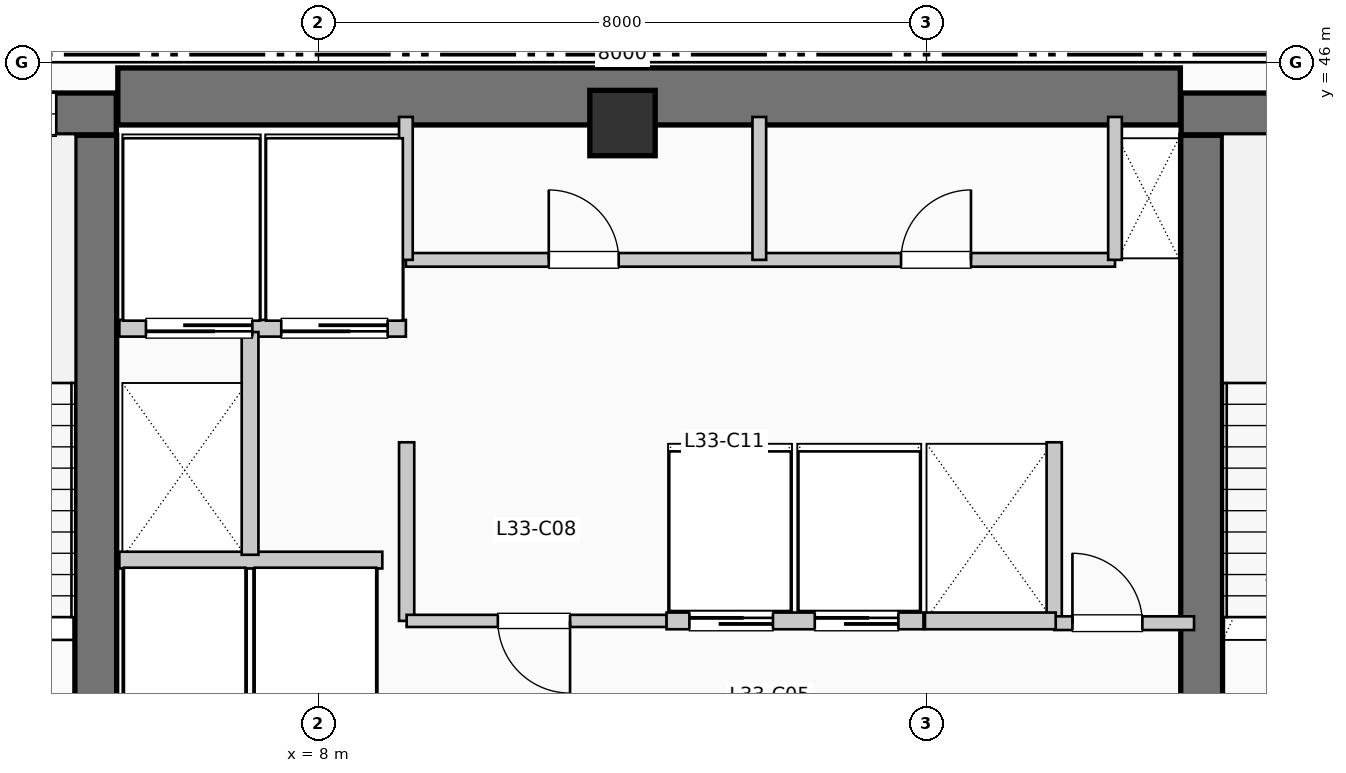
"""IFC4 building model, lengths in metres.
Left out: names, types, materials, properties, quantities, classifications, styles, units other than length and angle.
Written with IfcOpenShell. Run it as: python <this file> out.ifc"""

import sys

from ifc_helpers import new_model, si_unit, direction, frame, frame_2d, origin, origin_2d, place, context, subcontext, project, spatial, rectangle, extrude, element, fill, save


model = new_model("IFC4")
c1 = context("Model", 3, precision=1e-05, world=origin(), true_north=direction((0.0, 1.0)))
c2 = subcontext(c1, "Body", "Model", "MODEL_VIEW")
j1 = project(units=[si_unit("LENGTHUNIT", "METRE"), si_unit("PLANEANGLEUNIT", "RADIAN")], contexts=[c1])
p1 = place(None, origin())
s1 = spatial("IfcSite", under=j1, at=p1, CompositionType="ELEMENT")
p2 = place(p1, origin())
s2 = spatial("IfcBuilding", under=s1, at=p2, CompositionType="ELEMENT")
p3 = place(p2, frame((0.0, 0.0, 138.93)))
s3 = spatial("IfcBuildingStorey", under=s2, at=p3, CompositionType="ELEMENT", Elevation=138.93)
p4 = place(p3, frame((5.36, 45.55, 0.0), z_axis=(0.0, 0.0, 1.0), x_axis=(1.0, 0.0, 0.0)))
e1 = element("IfcWall", 1, at=p4, inside=s3, PredefinedType="SHEAR", context=c2, shape_type="SweptSolid", body=[
    extrude(rectangle(XDim=13.98, YDim=0.75, at=frame_2d((6.99, 0.0))), origin(), (0.0, 0.0, 1.0), 3.96),
])
p5 = place(p3, frame((5.07, 37.15, 0.0), z_axis=(0.0, 0.0, 1.0), x_axis=(0.0, 1.0, 0.0)))
e2 = element("IfcWall", 2, at=p5, inside=s3, PredefinedType="SHEAR", context=c2, shape_type="SweptSolid", body=[
    extrude(rectangle(XDim=7.89, YDim=0.55, at=frame_2d((3.945, 0.0))), origin(), (0.0, 0.0, 1.0), 3.96),
])
p6 = place(p3, frame((1.1, 45.32, 0.0), z_axis=(0.0, 0.0, 1.0), x_axis=(1.0, 0.0, 0.0)))
e3 = element("IfcWall", 3, at=p6, inside=s3, PredefinedType="SHEAR", context=c2, shape_type="SweptSolid", body=[
    extrude(rectangle(XDim=4.24, YDim=0.55, at=frame_2d((2.12, 0.0))), origin(), (0.0, 0.0, 1.0), 3.96),
])
p7 = place(p6, frame((2.05, 0.0, 1.05)))
e4 = element("IfcOpeningElement", 4, at=p7, cuts=e3, PredefinedType="OPENING", context=c2, shape_type="SweptSolid", body=[
    extrude(rectangle(XDim=1.4, YDim=1.8, at=frame_2d((0.7, 0.9))), frame((0.0, 0.285, 0.0), z_axis=(0.0, -1.0, 0.0), x_axis=(1.0, 0.0, 0.0)), (0.0, 0.0, 1.0), 0.57),
])
p8 = place(p3, frame((19.62, 37.15, 0.0), z_axis=(0.0, 0.0, 1.0), x_axis=(0.0, 1.0, 0.0)))
e5 = element("IfcWall", 5, at=p8, inside=s3, PredefinedType="SHEAR", context=c2, shape_type="SweptSolid", body=[
    extrude(rectangle(XDim=7.89, YDim=0.55, at=frame_2d((3.945, 0.0))), origin(), (0.0, 0.0, 1.0), 3.96),
])
p9 = place(p3, frame((19.35, 45.32, 0.0), z_axis=(0.0, 0.0, 1.0), x_axis=(1.0, 0.0, 0.0)))
e6 = element("IfcWall", 6, at=p9, inside=s3, PredefinedType="SHEAR", context=c2, shape_type="SweptSolid", body=[
    extrude(rectangle(XDim=3.69, YDim=0.55, at=frame_2d((1.845, 0.0))), origin(), (0.0, 0.0, 1.0), 3.96),
])
p10 = place(p9, frame((1.15, 0.0, 1.05)))
e7 = element("IfcOpeningElement", 7, at=p10, cuts=e6, PredefinedType="OPENING", context=c2, shape_type="SweptSolid", body=[
    extrude(rectangle(XDim=1.4, YDim=1.8, at=frame_2d((0.7, 0.9))), frame((0.0, 0.285, 0.0), z_axis=(0.0, -1.0, 0.0), x_axis=(1.0, 0.0, 0.0)), (0.0, 0.0, 1.0), 0.57),
])
p11 = place(p3, frame((12.0, 45.2, 0.0), z_axis=(0.0, 0.0, 1.0), x_axis=(1.0, 0.0, 0.0)))
e8 = element("IfcColumn", 8, at=p11, inside=s3, PredefinedType="COLUMN", context=c2, shape_type="SweptSolid", body=[
    extrude(rectangle(XDim=0.86, YDim=0.86, at=origin_2d()), origin(), (0.0, 0.0, 1.0), 3.96),
])
p12 = place(p3, frame((5.38, 39.45, 0.0), z_axis=(0.0, 0.0, 1.0), x_axis=(1.0, 0.0, 0.0)))
e9 = element("IfcWall", 9, at=p12, inside=s3, PredefinedType="PARTITIONING", context=c2, shape_type="SweptSolid", body=[
    extrude(rectangle(XDim=3.46, YDim=0.22, at=frame_2d((1.73, 0.0))), origin(), (0.0, 0.0, 1.0), 3.71),
])
p13 = place(p3, frame((5.38, 42.5, 0.0), z_axis=(0.0, 0.0, 1.0), x_axis=(1.0, 0.0, 0.0)))
e10 = element("IfcWall", 10, at=p13, inside=s3, PredefinedType="PARTITIONING", context=c2, shape_type="SweptSolid", body=[
    extrude(rectangle(XDim=3.77, YDim=0.22, at=frame_2d((1.885, 0.0))), origin(), (0.0, 0.0, 1.0), 3.71),
])
p14 = place(p13, frame((1.75, 0.0, 0.0), z_axis=(0.0, 0.0, 1.0), x_axis=(-1.0, 0.0, 0.0)))
e11 = element("IfcOpeningElement", 11, at=p14, cuts=e10, PredefinedType="OPENING", context=c2, shape_type="SweptSolid", body=[
    extrude(rectangle(XDim=1.4, YDim=2.2, at=frame_2d((0.7, 1.1))), frame((0.0, 0.12, 0.0), z_axis=(0.0, -1.0, 0.0), x_axis=(1.0, 0.0, 0.0)), (0.0, 0.0, 1.0), 0.24),
])
p15 = place(p13, frame((3.53, 0.0, 0.0), z_axis=(0.0, 0.0, 1.0), x_axis=(-1.0, 0.0, 0.0)))
e12 = element("IfcOpeningElement", 12, at=p15, cuts=e10, PredefinedType="OPENING", context=c2, shape_type="SweptSolid", body=[
    extrude(rectangle(XDim=1.4, YDim=2.2, at=frame_2d((0.7, 1.1))), frame((0.0, 0.12, 0.0), z_axis=(0.0, -1.0, 0.0), x_axis=(1.0, 0.0, 0.0)), (0.0, 0.0, 1.0), 0.24),
])
p16 = place(p3, frame((7.1, 39.52, 0.0), z_axis=(0.0, 0.0, 1.0), x_axis=(0.0, 1.0, 0.0)))
e13 = element("IfcWall", 13, at=p16, inside=s3, PredefinedType="PARTITIONING", context=c2, shape_type="SweptSolid", body=[
    extrude(rectangle(XDim=2.93, YDim=0.22, at=frame_2d((1.465, 0.0))), origin(), (0.0, 0.0, 1.0), 3.71),
])
for number, where, z_axis, x_axis in (
    (14, (9.16, 38.65, 0.0), (0.0, 0.0, 1.0), (0.0, 1.0, 0.0)),
    (15, (17.68, 38.65, 0.0), (0.0, 0.0, 1.0), (0.0, 1.0, 0.0)),
):
    element("IfcWall", number, at=place(p3, frame(where, z_axis=z_axis, x_axis=x_axis)), inside=s3, PredefinedType="PARTITIONING", context=c2, shape_type="SweptSolid", body=[
        extrude(rectangle(XDim=2.35, YDim=0.2, at=frame_2d((1.175, 0.0))), origin(), (0.0, 0.0, 1.0), 3.71),
    ])
p17 = place(p3, frame((17.68, 38.62, 0.0), z_axis=(0.0, 0.0, 1.0), x_axis=(1.0, 0.0, 0.0)))
e16 = element("IfcWall", 16, at=p17, inside=s3, PredefinedType="PARTITIONING", context=c2, shape_type="SweptSolid", body=[
    extrude(rectangle(XDim=1.84, YDim=0.18, at=frame_2d((0.92, 0.0))), origin(), (0.0, 0.0, 1.0), 3.71),
])
p18 = place(p17, frame((0.24, 0.0, 0.0)))
e17 = element("IfcOpeningElement", 17, at=p18, cuts=e16, PredefinedType="OPENING", context=c2, shape_type="SweptSolid", body=[
    extrude(rectangle(XDim=0.92, YDim=2.1, at=frame_2d((0.46, 1.05))), frame((0.0, 0.1, 0.0), z_axis=(0.0, -1.0, 0.0), x_axis=(1.0, 0.0, 0.0)), (0.0, 0.0, 1.0), 0.2),
])
p19 = place(p3, frame((9.16, 38.65, 0.0), z_axis=(0.0, 0.0, 1.0), x_axis=(1.0, 0.0, 0.0)))
e18 = element("IfcWall", 18, at=p19, inside=s3, PredefinedType="PARTITIONING", context=c2, shape_type="SweptSolid", body=[
    extrude(rectangle(XDim=3.42, YDim=0.16, at=frame_2d((1.71, 0.0))), origin(), (0.0, 0.0, 1.0), 3.71),
])
p20 = place(p19, frame((2.15, 0.0, 0.0), z_axis=(0.0, 0.0, 1.0), x_axis=(-1.0, 0.0, 0.0)))
e19 = element("IfcOpeningElement", 19, at=p20, cuts=e18, PredefinedType="OPENING", context=c2, shape_type="SweptSolid", body=[
    extrude(rectangle(XDim=0.95, YDim=2.15, at=frame_2d((0.475, 1.075))), frame((0.0, 0.09, 0.0), z_axis=(0.0, -1.0, 0.0), x_axis=(1.0, 0.0, 0.0)), (0.0, 0.0, 1.0), 0.18),
])
p21 = place(p3, frame((12.58, 38.65, 0.0), z_axis=(0.0, 0.0, 1.0), x_axis=(1.0, 0.0, 0.0)))
e20 = element("IfcWall", 20, at=p21, inside=s3, PredefinedType="PARTITIONING", context=c2, shape_type="SweptSolid", body=[
    extrude(rectangle(XDim=3.38, YDim=0.22, at=frame_2d((1.69, 0.0))), origin(), (0.0, 0.0, 1.0), 3.71),
])
p22 = place(p21, frame((0.3, 0.0, 0.0)))
e21 = element("IfcOpeningElement", 21, at=p22, cuts=e20, PredefinedType="OPENING", context=c2, shape_type="SweptSolid", body=[
    extrude(rectangle(XDim=1.1, YDim=2.2, at=frame_2d((0.55, 1.1))), frame((0.0, 0.12, 0.0), z_axis=(0.0, -1.0, 0.0), x_axis=(1.0, 0.0, 0.0)), (0.0, 0.0, 1.0), 0.24),
])
p23 = place(p21, frame((1.95, 0.0, 0.0)))
e22 = element("IfcOpeningElement", 22, at=p23, cuts=e20, PredefinedType="OPENING", context=c2, shape_type="SweptSolid", body=[
    extrude(rectangle(XDim=1.1, YDim=2.2, at=frame_2d((0.55, 1.1))), frame((0.0, 0.12, 0.0), z_axis=(0.0, -1.0, 0.0), x_axis=(1.0, 0.0, 0.0)), (0.0, 0.0, 1.0), 0.24),
])
p24 = place(p3, frame((15.98, 38.65, 0.0), z_axis=(0.0, 0.0, 1.0), x_axis=(1.0, 0.0, 0.0)))
e23 = element("IfcWall", 23, at=p24, inside=s3, PredefinedType="PARTITIONING", context=c2, shape_type="SweptSolid", body=[
    extrude(rectangle(XDim=1.72, YDim=0.22, at=frame_2d((0.86, 0.0))), origin(), (0.0, 0.0, 1.0), 3.71),
])
p25 = place(p3, frame((9.15, 43.4, 0.0), z_axis=(0.0, 0.0, 1.0), x_axis=(1.0, 0.0, 0.0)))
e24 = element("IfcWall", 24, at=p25, inside=s3, PredefinedType="PLUMBINGWALL", context=c2, shape_type="SweptSolid", body=[
    extrude(rectangle(XDim=9.33, YDim=0.18, at=frame_2d((4.665, 0.0))), origin(), (0.0, 0.0, 1.0), 3.71),
])
p26 = place(p25, frame((1.88, 0.0, 0.0)))
e25 = element("IfcOpeningElement", 25, at=p26, cuts=e24, PredefinedType="OPENING", context=c2, shape_type="SweptSolid", body=[
    extrude(rectangle(XDim=0.92, YDim=2.1, at=frame_2d((0.46, 1.05))), frame((0.0, 0.1, 0.0), z_axis=(0.0, -1.0, 0.0), x_axis=(1.0, 0.0, 0.0)), (0.0, 0.0, 1.0), 0.2),
])
p27 = place(p25, frame((6.515, 0.0, 0.0)))
e26 = element("IfcOpeningElement", 26, at=p27, cuts=e24, PredefinedType="OPENING", context=c2, shape_type="SweptSolid", body=[
    extrude(rectangle(XDim=0.92, YDim=2.1, at=frame_2d((0.46, 1.05))), frame((0.0, 0.1, 0.0), z_axis=(0.0, -1.0, 0.0), x_axis=(1.0, 0.0, 0.0)), (0.0, 0.0, 1.0), 0.2),
])
for number, where, z_axis, x_axis in (
    (27, (9.15, 43.4, 0.0), (0.0, 0.0, 1.0), (0.0, 1.0, 0.0)),
    (28, (18.48, 43.4, 0.0), (0.0, 0.0, 1.0), (0.0, 1.0, 0.0)),
    (29, (13.8, 43.4, 0.0), (0.0, 0.0, 1.0), (0.0, 1.0, 0.0)),
):
    element("IfcWall", number, at=place(p3, frame(where, z_axis=z_axis, x_axis=x_axis)), inside=s3, PredefinedType="PLUMBINGWALL", context=c2, shape_type="SweptSolid", body=[
        extrude(rectangle(XDim=1.88, YDim=0.18, at=frame_2d((0.94, 0.0))), origin(), (0.0, 0.0, 1.0), 3.71),
    ])
p28 = place(p7, origin())
e30 = element("IfcWindow", 30, at=p28, inside=s3, PartitioningType="SINGLE_PANEL", PredefinedType="WINDOW", context=c2, shape_type="SweptSolid", body=[
    extrude(rectangle(XDim=1.4, YDim=1.8, at=frame_2d((0.7, 0.9))), frame((0.0, 0.03, 0.0), z_axis=(0.0, -1.0, 0.0), x_axis=(1.0, 0.0, 0.0)), (0.0, 0.0, 1.0), 0.06),
])
fill(e4, e30)
p29 = place(p14, origin())
e31 = element("IfcDoor", 31, at=p29, inside=s3, OperationType="SLIDING_TO_LEFT", PredefinedType="DOOR", context=c2, shape_type="SweptSolid", body=[
    extrude(rectangle(XDim=1.4, YDim=2.2, at=frame_2d((0.7, 1.1))), frame((0.0, 0.025, 0.0), z_axis=(0.0, -1.0, 0.0), x_axis=(1.0, 0.0, 0.0)), (0.0, 0.0, 1.0), 0.05),
])
fill(e11, e31)
p30 = place(p15, origin())
e32 = element("IfcDoor", 32, at=p30, inside=s3, OperationType="SLIDING_TO_LEFT", PredefinedType="DOOR", context=c2, shape_type="SweptSolid", body=[
    extrude(rectangle(XDim=1.4, YDim=2.2, at=frame_2d((0.7, 1.1))), frame((0.0, 0.025, 0.0), z_axis=(0.0, -1.0, 0.0), x_axis=(1.0, 0.0, 0.0)), (0.0, 0.0, 1.0), 0.05),
])
fill(e12, e32)
p31 = place(p18, origin())
e33 = element("IfcDoor", 33, at=p31, inside=s3, OperationType="SINGLE_SWING_LEFT", PredefinedType="DOOR", context=c2, shape_type="SweptSolid", body=[
    extrude(rectangle(XDim=0.92, YDim=2.1, at=frame_2d((0.46, 1.05))), frame((0.0, 0.025, 0.0), z_axis=(0.0, -1.0, 0.0), x_axis=(1.0, 0.0, 0.0)), (0.0, 0.0, 1.0), 0.05),
])
fill(e17, e33)
p32 = place(p20, origin())
e34 = element("IfcDoor", 34, at=p32, inside=s3, OperationType="SINGLE_SWING_RIGHT", PredefinedType="DOOR", context=c2, shape_type="SweptSolid", body=[
    extrude(rectangle(XDim=0.95, YDim=2.15, at=frame_2d((0.475, 1.075))), frame((0.0, 0.025, 0.0), z_axis=(0.0, -1.0, 0.0), x_axis=(1.0, 0.0, 0.0)), (0.0, 0.0, 1.0), 0.05),
])
fill(e19, e34)
p33 = place(p22, origin())
e35 = element("IfcDoor", 35, at=p33, inside=s3, OperationType="SLIDING_TO_RIGHT", PredefinedType="DOOR", context=c2, shape_type="SweptSolid", body=[
    extrude(rectangle(XDim=1.1, YDim=2.2, at=frame_2d((0.55, 1.1))), frame((0.0, 0.025, 0.0), z_axis=(0.0, -1.0, 0.0), x_axis=(1.0, 0.0, 0.0)), (0.0, 0.0, 1.0), 0.05),
])
fill(e21, e35)
p34 = place(p23, origin())
e36 = element("IfcDoor", 36, at=p34, inside=s3, OperationType="SLIDING_TO_RIGHT", PredefinedType="DOOR", context=c2, shape_type="SweptSolid", body=[
    extrude(rectangle(XDim=1.1, YDim=2.2, at=frame_2d((0.55, 1.1))), frame((0.0, 0.025, 0.0), z_axis=(0.0, -1.0, 0.0), x_axis=(1.0, 0.0, 0.0)), (0.0, 0.0, 1.0), 0.05),
])
fill(e22, e36)
p35 = place(p26, origin())
e37 = element("IfcDoor", 37, at=p35, inside=s3, OperationType="SINGLE_SWING_LEFT", PredefinedType="DOOR", context=c2, shape_type="SweptSolid", body=[
    extrude(rectangle(XDim=0.92, YDim=2.1, at=frame_2d((0.46, 1.05))), frame((0.0, 0.025, 0.0), z_axis=(0.0, -1.0, 0.0), x_axis=(1.0, 0.0, 0.0)), (0.0, 0.0, 1.0), 0.05),
])
fill(e25, e37)
p36 = place(p27, origin())
e38 = element("IfcDoor", 38, at=p36, inside=s3, OperationType="SINGLE_SWING_RIGHT", PredefinedType="DOOR", context=c2, shape_type="SweptSolid", body=[
    extrude(rectangle(XDim=0.92, YDim=2.1, at=frame_2d((0.46, 1.05))), frame((0.0, 0.025, 0.0), z_axis=(0.0, -1.0, 0.0), x_axis=(1.0, 0.0, 0.0)), (0.0, 0.0, 1.0), 0.05),
])
fill(e26, e38)
save(model, sys.argv[1])
